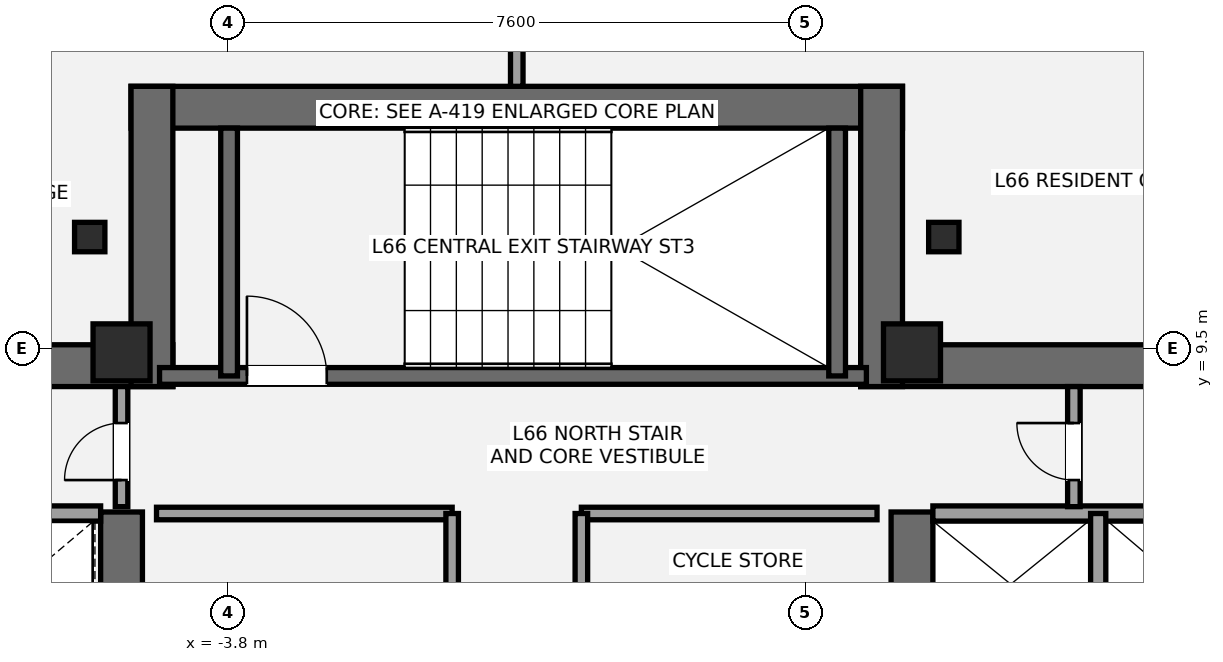
"""IFC4 building model, lengths in metres.
Left out: names, types, materials, properties, quantities, classifications, styles, units other than length and angle.
Written with IfcOpenShell. Run it as: python <this file> out.ifc"""

import sys

from ifc_helpers import new_model, si_unit, direction, frame, frame_2d, origin, origin_2d, place, context, subcontext, project, spatial, rectangle, i_section, extrude, element, fill, save


model = new_model("IFC4")
c1 = context("Model", 3, precision=1e-05, world=origin(), true_north=direction((0.0, 1.0)))
c2 = subcontext(c1, "Body", "Model", "MODEL_VIEW")
j1 = project(units=[si_unit("LENGTHUNIT", "METRE"), si_unit("PLANEANGLEUNIT", "RADIAN")], contexts=[c1])
p1 = place(None, origin())
s1 = spatial("IfcSite", under=j1, at=p1, CompositionType="ELEMENT")
p2 = place(p1, origin())
s2 = spatial("IfcBuilding", under=s1, at=p2, CompositionType="ELEMENT")
p3 = place(p2, frame((0.0, 0.0, 235.2)))
s3 = spatial("IfcBuildingStorey", under=s2, at=p3, CompositionType="ELEMENT", Elevation=235.2)
p4 = place(p3, frame((-13.7, 9.275, 0.0), z_axis=(0.0, 0.0, 1.0), x_axis=(1.0, 0.0, 0.0)))
e1 = element("IfcWall", 1, at=p4, inside=s3, PredefinedType="SHEAR", context=c2, shape_type="SweptSolid", body=[
    extrude(rectangle(XDim=9.175, YDim=0.55, at=frame_2d((4.587, 0.0))), origin(), (0.0, 0.0, 1.0), 3.15),
])
p5 = place(p3, frame((-5.2, 5.35, 0.0), z_axis=(0.0, 0.0, 1.0), x_axis=(0.0, 1.0, 0.0)))
e2 = element("IfcWall", 2, at=p5, inside=s3, PredefinedType="SHEAR", context=c2, shape_type="SweptSolid", body=[
    extrude(rectangle(XDim=2.0, YDim=0.55, at=frame_2d((1.0, 0.0))), origin(), (0.0, 0.0, 1.0), 3.15),
])
p6 = place(p3, frame((4.525, 9.275, 0.0), z_axis=(0.0, 0.0, 1.0), x_axis=(1.0, 0.0, 0.0)))
e3 = element("IfcWall", 3, at=p6, inside=s3, PredefinedType="SHEAR", context=c2, shape_type="SweptSolid", body=[
    extrude(rectangle(XDim=9.175, YDim=0.55, at=frame_2d((4.587, 0.0))), origin(), (0.0, 0.0, 1.0), 3.15),
])
p7 = place(p3, frame((5.2, 5.35, 0.0), z_axis=(0.0, 0.0, 1.0), x_axis=(0.0, 1.0, 0.0)))
e4 = element("IfcWall", 4, at=p7, inside=s3, PredefinedType="SHEAR", context=c2, shape_type="SweptSolid", body=[
    extrude(rectangle(XDim=2.0, YDim=0.55, at=frame_2d((1.0, 0.0))), origin(), (0.0, 0.0, 1.0), 3.15),
])
p8 = place(p3, frame((-5.075, 12.675, 0.0), z_axis=(0.0, 0.0, 1.0), x_axis=(1.0, 0.0, 0.0)))
e5 = element("IfcWall", 5, at=p8, inside=s3, PredefinedType="SHEAR", context=c2, shape_type="SweptSolid", body=[
    extrude(rectangle(XDim=10.15, YDim=0.55, at=frame_2d((5.075, 0.0))), origin(), (0.0, 0.0, 1.0), 3.15),
])
for number, where, z_axis, x_axis in (
    (6, (-4.8, 9.0, 0.0), (0.0, 0.0, 1.0), (0.0, 1.0, 0.0)),
    (7, (4.8, 9.0, 0.0), (0.0, 0.0, 1.0), (0.0, 1.0, 0.0)),
):
    element("IfcWall", number, at=place(p3, frame(where, z_axis=z_axis, x_axis=x_axis)), inside=s3, PredefinedType="SHEAR", context=c2, shape_type="SweptSolid", body=[
        extrude(rectangle(XDim=3.95, YDim=0.55, at=frame_2d((1.975, 0.0))), origin(), (0.0, 0.0, 1.0), 3.15),
    ])
p9 = place(p3, frame((-4.7, 9.14, 0.0), z_axis=(0.0, 0.0, 1.0), x_axis=(1.0, 0.0, 0.0)))
e8 = element("IfcWall", 8, at=p9, inside=s3, PredefinedType="SHEAR", context=c2, shape_type="SweptSolid", body=[
    extrude(rectangle(XDim=9.3, YDim=0.22, at=frame_2d((4.65, 0.0))), origin(), (0.0, 0.0, 1.0), 3.15),
])
p10 = place(p9, frame((1.15, 0.0, 0.0)))
e9 = element("IfcOpeningElement", 9, at=p10, cuts=e8, PredefinedType="OPENING", context=c2, shape_type="SweptSolid", body=[
    extrude(rectangle(XDim=1.05, YDim=2.15, at=frame_2d((0.525, 1.075))), frame((0.0, 0.12, 0.0), z_axis=(0.0, -1.0, 0.0), x_axis=(1.0, 0.0, 0.0)), (0.0, 0.0, 1.0), 0.24),
])
for number, where, z_axis, x_axis in (
    (10, (-3.785, 9.14, 0.0), (0.0, 0.0, 1.0), (0.0, 1.0, 0.0)),
    (11, (4.215, 9.14, 0.0), (0.0, 0.0, 1.0), (0.0, 1.0, 0.0)),
):
    element("IfcWall", number, at=place(p3, frame(where, z_axis=z_axis, x_axis=x_axis)), inside=s3, PredefinedType="SHEAR", context=c2, shape_type="SweptSolid", body=[
        extrude(rectangle(XDim=3.26, YDim=0.22, at=frame_2d((1.63, 0.0))), origin(), (0.0, 0.0, 1.0), 3.15),
    ])
for number, where, z_axis, x_axis in (
    (12, (-5.2, 9.45, 0.0), (0.0, 0.0, 1.0), (1.0, 0.0, 0.0)),
    (13, (5.2, 9.45, 0.0), (0.0, 0.0, 1.0), (1.0, 0.0, 0.0)),
):
    element("IfcColumn", number, at=place(p3, frame(where, z_axis=z_axis, x_axis=x_axis)), inside=s3, PredefinedType="PILASTER", context=c2, shape_type="SweptSolid", body=[
        extrude(rectangle(XDim=0.75, YDim=0.75, at=origin_2d()), origin(), (0.0, 0.0, 1.0), 3.15),
    ])
for number, where, z_axis, x_axis in (
    (14, (5.619, 10.967, 0.0), (0.0, 0.0, 1.0), (1.0, 0.0, 0.0)),
    (15, (-5.619, 10.967, 0.0), (0.0, 0.0, 1.0), (1.0, 0.0, 0.0)),
):
    element("IfcColumn", number, at=place(p3, frame(where, z_axis=z_axis, x_axis=x_axis)), inside=s3, PredefinedType="COLUMN", context=c2, shape_type="SweptSolid", body=[
        extrude(i_section(OverallWidth=0.399, OverallDepth=0.387, WebThickness=0.021, FlangeThickness=0.033, at=origin_2d()), origin(), (0.0, 0.0, 1.0), 3.15),
    ])
p11 = place(p3, frame((6.377, 14.151, 0.0), z_axis=(0.0, 0.0, 1.0), x_axis=(0.974398936081, -0.224825962391, 0.0)))
e16 = element("IfcWall", 16, at=p11, inside=s3, PredefinedType="STANDARD", context=c2, shape_type="SweptSolid", body=[
    extrude(rectangle(XDim=4.252, YDim=0.44, at=frame_2d((2.126, 0.0))), origin(), (0.0, 0.0, 1.0), 2.336),
])
p12 = place(p11, frame((1.622, 0.0, 0.55)))
e17 = element("IfcOpeningElement", 17, at=p12, cuts=e16, PredefinedType="OPENING", context=c2, shape_type="SweptSolid", body=[
    extrude(rectangle(XDim=1.4, YDim=1.55, at=frame_2d((0.7, 0.775))), frame((0.0, 0.23, 0.0), z_axis=(0.0, -1.0, 0.0), x_axis=(1.0, 0.0, 0.0)), (0.0, 0.0, 1.0), 0.46),
])
for number, where, z_axis, x_axis in (
    (18, (-9.78, 7.33, 0.0), (0.0, 0.0, 1.0), (1.0, 0.0, 0.0)),
    (19, (5.475, 7.33, 0.0), (0.0, 0.0, 1.0), (1.0, 0.0, 0.0)),
):
    element("IfcWall", number, at=place(p3, frame(where, z_axis=z_axis, x_axis=x_axis)), inside=s3, PredefinedType="SOLIDWALL", context=c2, shape_type="SweptSolid", body=[
        extrude(rectangle(XDim=4.305, YDim=0.2, at=frame_2d((2.152, 0.0))), origin(), (0.0, 0.0, 1.0), 2.97),
    ])
p13 = place(p3, frame((7.65, 5.47, 0.0), z_axis=(0.0, 0.0, 1.0), x_axis=(0.0, 1.0, 0.0)))
e20 = element("IfcWall", 20, at=p13, inside=s3, PredefinedType="SOLIDWALL", context=c2, shape_type="SweptSolid", body=[
    extrude(rectangle(XDim=1.86, YDim=0.2, at=frame_2d((0.93, 0.0))), origin(), (0.0, 0.0, 1.0), 2.97),
])
p14 = place(p3, frame((-4.74, 7.33, 0.0), z_axis=(0.0, 0.0, 1.0), x_axis=(1.0, 0.0, 0.0)))
e21 = element("IfcWall", 21, at=p14, inside=s3, PredefinedType="PARTITIONING", context=c2, shape_type="SweptSolid", body=[
    extrude(rectangle(XDim=3.89, YDim=0.165, at=frame_2d((1.945, 0.0))), origin(), (0.0, 0.0, 1.0), 2.97),
])
p15 = place(p3, frame((-0.85, 5.52, 0.0), z_axis=(0.0, 0.0, 1.0), x_axis=(0.0, 1.0, 0.0)))
e22 = element("IfcWall", 22, at=p15, inside=s3, PredefinedType="PARTITIONING", context=c2, shape_type="SweptSolid", body=[
    extrude(rectangle(XDim=1.81, YDim=0.165, at=frame_2d((0.905, 0.0))), origin(), (0.0, 0.0, 1.0), 2.97),
])
p16 = place(p3, frame((0.85, 7.33, 0.0), z_axis=(0.0, 0.0, 1.0), x_axis=(1.0, 0.0, 0.0)))
e23 = element("IfcWall", 23, at=p16, inside=s3, PredefinedType="PARTITIONING", context=c2, shape_type="SweptSolid", body=[
    extrude(rectangle(XDim=3.89, YDim=0.165, at=frame_2d((1.945, 0.0))), origin(), (0.0, 0.0, 1.0), 2.97),
])
p17 = place(p3, frame((0.85, 5.52, 0.0), z_axis=(0.0, 0.0, 1.0), x_axis=(0.0, 1.0, 0.0)))
e24 = element("IfcWall", 24, at=p17, inside=s3, PredefinedType="PARTITIONING", context=c2, shape_type="SweptSolid", body=[
    extrude(rectangle(XDim=1.81, YDim=0.165, at=frame_2d((0.905, 0.0))), origin(), (0.0, 0.0, 1.0), 2.97),
])
p18 = place(p3, frame((-5.2, 7.42, 0.0), z_axis=(0.0, 0.0, 1.0), x_axis=(0.0, 1.0, 0.0)))
e25 = element("IfcWall", 25, at=p18, inside=s3, PredefinedType="PARTITIONING", context=c2, shape_type="SweptSolid", body=[
    extrude(rectangle(XDim=1.58, YDim=0.165, at=frame_2d((0.79, 0.0))), origin(), (0.0, 0.0, 1.0), 2.97),
])
p19 = place(p18, frame((0.35, 0.0, 0.0)))
e26 = element("IfcOpeningElement", 26, at=p19, cuts=e25, PredefinedType="OPENING", context=c2, shape_type="SweptSolid", body=[
    extrude(rectangle(XDim=0.75, YDim=2.1, at=frame_2d((0.375, 1.05))), frame((0.0, 0.093, 0.0), z_axis=(0.0, -1.0, 0.0), x_axis=(1.0, 0.0, 0.0)), (0.0, 0.0, 1.0), 0.185),
])
p20 = place(p3, frame((7.33, 7.42, 0.0), z_axis=(0.0, 0.0, 1.0), x_axis=(0.0, 1.0, 0.0)))
e27 = element("IfcWall", 27, at=p20, inside=s3, PredefinedType="PARTITIONING", context=c2, shape_type="SweptSolid", body=[
    extrude(rectangle(XDim=1.58, YDim=0.165, at=frame_2d((0.79, 0.0))), origin(), (0.0, 0.0, 1.0), 2.97),
])
p21 = place(p20, frame((0.35, 0.0, 0.0)))
e28 = element("IfcOpeningElement", 28, at=p21, cuts=e27, PredefinedType="OPENING", context=c2, shape_type="SweptSolid", body=[
    extrude(rectangle(XDim=0.75, YDim=2.1, at=frame_2d((0.375, 1.05))), frame((0.0, 0.093, 0.0), z_axis=(0.0, -1.0, 0.0), x_axis=(1.0, 0.0, 0.0)), (0.0, 0.0, 1.0), 0.185),
])
p22 = place(p3, frame((0.0, 12.95, 0.0), z_axis=(0.0, 0.0, 1.0), x_axis=(0.0, 1.0, 0.0)))
e29 = element("IfcWall", 29, at=p22, inside=s3, PredefinedType="PARTITIONING", context=c2, shape_type="SweptSolid", body=[
    extrude(rectangle(XDim=1.391, YDim=0.165, at=frame_2d((0.695, 0.0))), origin(), (0.0, 0.0, 1.0), 2.97),
])
p23 = place(p10, origin())
e30 = element("IfcDoor", 30, at=p23, inside=s3, OperationType="SINGLE_SWING_LEFT", PredefinedType="DOOR", context=c2, shape_type="SweptSolid", body=[
    extrude(rectangle(XDim=1.05, YDim=2.15, at=frame_2d((0.525, 1.075))), frame((0.0, 0.025, 0.0), z_axis=(0.0, -1.0, 0.0), x_axis=(1.0, 0.0, 0.0)), (0.0, 0.0, 1.0), 0.05),
])
fill(e9, e30)
p24 = place(p19, origin())
e31 = element("IfcDoor", 31, at=p24, inside=s3, OperationType="SINGLE_SWING_LEFT", PredefinedType="DOOR", context=c2, shape_type="SweptSolid", body=[
    extrude(rectangle(XDim=0.75, YDim=2.1, at=frame_2d((0.375, 1.05))), frame((0.0, 0.025, 0.0), z_axis=(0.0, -1.0, 0.0), x_axis=(1.0, 0.0, 0.0)), (0.0, 0.0, 1.0), 0.05),
])
fill(e26, e31)
p25 = place(p21, origin())
e32 = element("IfcDoor", 32, at=p25, inside=s3, OperationType="SINGLE_SWING_RIGHT", PredefinedType="DOOR", context=c2, shape_type="SweptSolid", body=[
    extrude(rectangle(XDim=0.75, YDim=2.1, at=frame_2d((0.375, 1.05))), frame((0.0, 0.025, 0.0), z_axis=(0.0, -1.0, 0.0), x_axis=(1.0, 0.0, 0.0)), (0.0, 0.0, 1.0), 0.05),
])
fill(e28, e32)
save(model, sys.argv[1])
